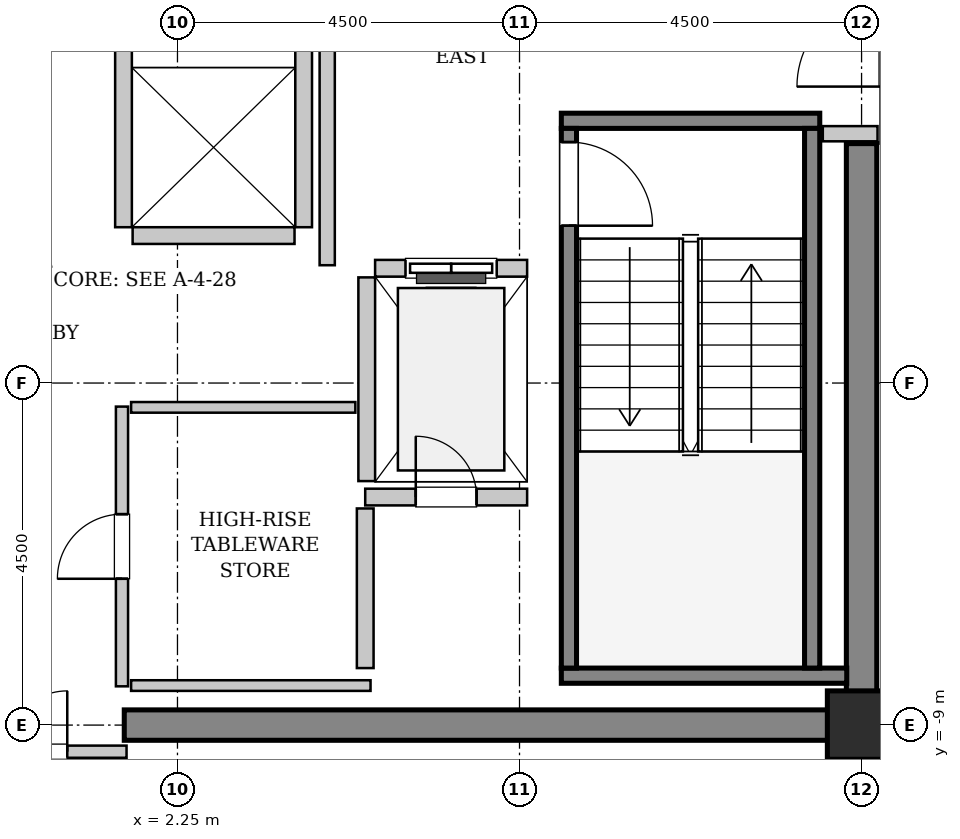
"""IFC4 building model, lengths in metres.
Left out: names, types, materials, properties, quantities, classifications, styles, units other than length and angle.
Written with IfcOpenShell. Run it as: python <this file> out.ifc"""

import sys

from ifc_helpers import new_model, si_unit, direction, frame, frame_2d, origin, origin_2d, place, context, subcontext, project, spatial, rectangle, extrude, source, transform, mapped, element, fill, save


model = new_model("IFC4")
c1 = context("Model", 3, precision=1e-05, world=origin(), true_north=direction((0.0, 1.0)))
c2 = subcontext(c1, "Body", "Model", "MODEL_VIEW")
j1 = project(units=[si_unit("LENGTHUNIT", "METRE"), si_unit("PLANEANGLEUNIT", "RADIAN")], contexts=[c1])
p1 = place(None, origin())
s1 = spatial("IfcSite", under=j1, at=p1, CompositionType="ELEMENT")
p2 = place(p1, origin())
s2 = spatial("IfcBuilding", under=s1, at=p2, CompositionType="ELEMENT")
p3 = place(p2, frame((0.0, 0.0, 330.0)))
s3 = spatial("IfcBuildingStorey", under=s2, at=p3, CompositionType="ELEMENT", Elevation=330.0)
m1 = source(origin(), c2, "Body", "SweptSolid", [
    extrude(rectangle(XDim=9.9, YDim=0.4, at=frame_2d((4.95, 0.0))), origin(), (0.0, 0.0, 1.0), 3.8),
])
p4 = place(p3, frame((1.55, -9.0, 0.0), z_axis=(0.0, 0.0, 1.0), x_axis=(1.0, 0.0, 0.0)))
e1 = element("IfcWall", 1, at=p4, inside=s3, PredefinedType="SHEAR", context=c2, shape_type="MappedRepresentation", body=[
    mapped(m1, transform((0.0, 0.0, 0.0), x_axis=(1.0, 0.0, 0.0), y_axis=(0.0, 1.0, 0.0), z_axis=(0.0, 0.0, 1.0), scale=1.0)),
])
m2 = source(origin(), c2, "Body", "SweptSolid", [
    extrude(rectangle(XDim=7.45, YDim=0.4, at=frame_2d((3.725, 0.0))), origin(), (0.0, 0.0, 1.0), 3.8),
])
p5 = place(p3, frame((11.25, -8.8, 0.0), z_axis=(0.0, 0.0, 1.0), x_axis=(0.0, 1.0, 0.0)))
e2 = element("IfcWall", 2, at=p5, inside=s3, PredefinedType="SHEAR", context=c2, shape_type="MappedRepresentation", body=[
    mapped(m2, transform((0.0, 0.0, 0.0), x_axis=(1.0, 0.0, 0.0), y_axis=(0.0, 1.0, 0.0), z_axis=(0.0, 0.0, 1.0), scale=1.0)),
])
m3 = source(origin(), c2, "Body", "SweptSolid", [
    extrude(rectangle(XDim=0.9, YDim=0.9, at=origin_2d()), origin(), (0.0, 0.0, 1.0), 3.8),
])
p6 = place(p3, frame((11.25, -9.0, 0.0), z_axis=(0.0, 0.0, 1.0), x_axis=(1.0, 0.0, 0.0)))
e3 = element("IfcColumn", 3, at=p6, inside=s3, PredefinedType="COLUMN", context=c2, shape_type="MappedRepresentation", body=[
    mapped(m3, transform((0.0, 0.0, 0.0), x_axis=(1.0, 0.0, 0.0), y_axis=(0.0, 1.0, 0.0), z_axis=(0.0, 0.0, 1.0), scale=1.0)),
])
m4 = source(origin(), c2, "Body", "SweptSolid", [
    extrude(rectangle(XDim=3.4, YDim=0.2, at=frame_2d((1.7, 0.0))), origin(), (0.0, 0.0, 1.0), 3.8),
])
p7 = place(p3, frame((7.3, -1.05, 0.0), z_axis=(0.0, 0.0, 1.0), x_axis=(1.0, 0.0, 0.0)))
e4 = element("IfcWall", 4, at=p7, inside=s3, PredefinedType="SOLIDWALL", context=c2, shape_type="MappedRepresentation", body=[
    mapped(m4, transform((0.0, 0.0, 0.0), x_axis=(1.0, 0.0, 0.0), y_axis=(0.0, 1.0, 0.0), z_axis=(0.0, 0.0, 1.0), scale=1.0)),
])
m5 = source(origin(), c2, "Body", "SweptSolid", [
    extrude(rectangle(XDim=3.755, YDim=0.2, at=frame_2d((1.877, 0.0))), origin(), (0.0, 0.0, 1.0), 3.8),
])
p8 = place(p3, frame((7.3, -8.35, 0.0), z_axis=(0.0, 0.0, 1.0), x_axis=(1.0, 0.0, 0.0)))
e5 = element("IfcWall", 5, at=p8, inside=s3, PredefinedType="SOLIDWALL", context=c2, shape_type="MappedRepresentation", body=[
    mapped(m5, transform((0.0, 0.0, 0.0), x_axis=(1.0, 0.0, 0.0), y_axis=(0.0, 1.0, 0.0), z_axis=(0.0, 0.0, 1.0), scale=1.0)),
])
m6 = source(origin(), c2, "Body", "SweptSolid", [
    extrude(rectangle(XDim=7.1, YDim=0.2, at=frame_2d((3.55, 0.0))), origin(), (0.0, 0.0, 1.0), 3.8),
])
p9 = place(p3, frame((7.4, -1.15, 0.0), z_axis=(0.0, 0.0, 1.0), x_axis=(0.0, -1.0, 0.0)))
e6 = element("IfcWall", 6, at=p9, inside=s3, PredefinedType="SOLIDWALL", context=c2, shape_type="MappedRepresentation", body=[
    mapped(m6, transform((0.0, 0.0, 0.0), x_axis=(1.0, 0.0, 0.0), y_axis=(0.0, 1.0, 0.0), z_axis=(0.0, 0.0, 1.0), scale=1.0)),
])
p10 = place(p9, frame((0.18, 0.0, 0.0)))
e7 = element("IfcOpeningElement", 7, at=p10, cuts=e6, PredefinedType="OPENING", context=c2, shape_type="SweptSolid", body=[
    extrude(rectangle(XDim=1.1, YDim=2.15, at=frame_2d((0.55, 1.075))), frame((0.0, 0.11, 0.0), z_axis=(0.0, -1.0, 0.0), x_axis=(1.0, 0.0, 0.0)), (0.0, 0.0, 1.0), 0.22),
])
p11 = place(p3, frame((10.6, -1.15, 0.0), z_axis=(0.0, 0.0, 1.0), x_axis=(0.0, -1.0, 0.0)))
e8 = element("IfcWall", 8, at=p11, inside=s3, PredefinedType="SOLIDWALL", context=c2, shape_type="MappedRepresentation", body=[
    mapped(m6, transform((0.0, 0.0, 0.0), x_axis=(1.0, 0.0, 0.0), y_axis=(0.0, 1.0, 0.0), z_axis=(0.0, 0.0, 1.0), scale=1.0)),
])
m7 = source(origin(), c2, "Body", "SweptSolid", [
    extrude(rectangle(XDim=2.0, YDim=0.22, at=frame_2d((1.0, 0.0))), origin(), (0.0, 0.0, 1.0), 3.535),
])
p12 = place(p3, frame((6.85, -2.99, 0.0), z_axis=(0.0, 0.0, 1.0), x_axis=(-1.0, 0.0, 0.0)))
e9 = element("IfcWall", 9, at=p12, inside=s3, PredefinedType="SOLIDWALL", context=c2, shape_type="MappedRepresentation", body=[
    mapped(m7, transform((0.0, 0.0, 0.0), x_axis=(1.0, 0.0, 0.0), y_axis=(0.0, 1.0, 0.0), z_axis=(0.0, 0.0, 1.0), scale=1.0)),
])
p13 = place(p12, frame((0.4, 0.0, 0.0)))
e10 = element("IfcOpeningElement", 10, at=p13, cuts=e9, PredefinedType="OPENING", context=c2, shape_type="SweptSolid", body=[
    extrude(rectangle(XDim=1.2, YDim=2.2, at=frame_2d((0.6, 1.1))), frame((0.0, 0.12, 0.0), z_axis=(0.0, -1.0, 0.0), x_axis=(1.0, 0.0, 0.0)), (0.0, 0.0, 1.0), 0.24),
])
m8 = source(origin(), c2, "Body", "SweptSolid", [
    extrude(rectangle(XDim=2.68, YDim=0.22, at=frame_2d((1.34, 0.0))), origin(), (0.0, 0.0, 1.0), 3.535),
])
p14 = place(p3, frame((4.74, -3.11, 0.0), z_axis=(0.0, 0.0, 1.0), x_axis=(0.0, -1.0, 0.0)))
e11 = element("IfcWall", 11, at=p14, inside=s3, PredefinedType="SOLIDWALL", context=c2, shape_type="MappedRepresentation", body=[
    mapped(m8, transform((0.0, 0.0, 0.0), x_axis=(1.0, 0.0, 0.0), y_axis=(0.0, 1.0, 0.0), z_axis=(0.0, 0.0, 1.0), scale=1.0)),
])
m9 = source(origin(), c2, "Body", "SweptSolid", [
    extrude(rectangle(XDim=4.9, YDim=0.22, at=frame_2d((2.45, 0.0))), origin(), (0.0, 0.0, 1.0), 3.535),
])
for number, where, z_axis, x_axis in (
    (12, (1.54, 2.45, 0.0), (0.0, 0.0, 1.0), (0.0, -1.0, 0.0)),
    (13, (3.91, -2.45, 0.0), (0.0, 0.0, 1.0), (0.0, 1.0, 0.0)),
):
    element("IfcWall", number, at=place(p3, frame(where, z_axis=z_axis, x_axis=x_axis)), inside=s3, PredefinedType="SOLIDWALL", context=c2, shape_type="MappedRepresentation", body=[
        mapped(m9, transform((0.0, 0.0, 0.0), x_axis=(1.0, 0.0, 0.0), y_axis=(0.0, 1.0, 0.0), z_axis=(0.0, 0.0, 1.0), scale=1.0)),
    ])
m10 = source(origin(), c2, "Body", "SweptSolid", [
    extrude(rectangle(XDim=2.13, YDim=0.22, at=frame_2d((1.065, 0.0))), origin(), (0.0, 0.0, 1.0), 3.535),
])
p15 = place(p3, frame((1.66, -2.56, 0.0), z_axis=(0.0, 0.0, 1.0), x_axis=(1.0, 0.0, 0.0)))
e14 = element("IfcWall", 14, at=p15, inside=s3, PredefinedType="SOLIDWALL", context=c2, shape_type="MappedRepresentation", body=[
    mapped(m10, transform((0.0, 0.0, 0.0), x_axis=(1.0, 0.0, 0.0), y_axis=(0.0, 1.0, 0.0), z_axis=(0.0, 0.0, 1.0), scale=1.0)),
])
p16 = place(p3, frame((4.72, -6.0, 0.0), z_axis=(0.0, 0.0, 1.0), x_axis=(1.0, 0.0, 0.0)))
e15 = element("IfcWall", 15, at=p16, inside=s3, PredefinedType="SOLIDWALL", context=c2, shape_type="MappedRepresentation", body=[
    mapped(m10, transform((0.0, 0.0, 0.0), x_axis=(1.0, 0.0, 0.0), y_axis=(0.0, 1.0, 0.0), z_axis=(0.0, 0.0, 1.0), scale=1.0)),
])
p17 = place(p16, frame((0.665, 0.0, 0.0)))
e16 = element("IfcOpeningElement", 16, at=p17, cuts=e15, PredefinedType="OPENING", context=c2, shape_type="SweptSolid", body=[
    extrude(rectangle(XDim=0.8, YDim=2.0, at=frame_2d((0.4, 1.0))), frame((0.0, 0.12, 0.0), z_axis=(0.0, -1.0, 0.0), x_axis=(1.0, 0.0, 0.0)), (0.0, 0.0, 1.0), 0.24),
])
m11 = source(origin(), c2, "Body", "SweptSolid", [
    extrude(rectangle(XDim=2.1, YDim=0.22, at=frame_2d((1.05, 0.0))), origin(), (0.0, 0.0, 1.0), 3.535),
])
p18 = place(p3, frame((4.72, -8.25, 0.0), z_axis=(0.0, 0.0, 1.0), x_axis=(0.0, 1.0, 0.0)))
e17 = element("IfcWall", 17, at=p18, inside=s3, PredefinedType="SOLIDWALL", context=c2, shape_type="MappedRepresentation", body=[
    mapped(m11, transform((0.0, 0.0, 0.0), x_axis=(1.0, 0.0, 0.0), y_axis=(0.0, 1.0, 0.0), z_axis=(0.0, 0.0, 1.0), scale=1.0)),
])
m12 = source(origin(), c2, "Body", "SweptSolid", [
    extrude(rectangle(XDim=5.9, YDim=0.2, at=frame_2d((2.95, 0.0))), origin(), (0.0, 0.0, 1.0), 3.535),
])
p19 = place(p3, frame((4.22, -2.95, 0.0), z_axis=(0.0, 0.0, 1.0), x_axis=(0.0, 1.0, 0.0)))
e18 = element("IfcWall", 18, at=p19, inside=s3, PredefinedType="PARTITIONING", context=c2, shape_type="MappedRepresentation", body=[
    mapped(m12, transform((0.0, 0.0, 0.0), x_axis=(1.0, 0.0, 0.0), y_axis=(0.0, 1.0, 0.0), z_axis=(0.0, 0.0, 1.0), scale=1.0)),
])
m13 = source(origin(), c2, "Body", "SweptSolid", [
    extrude(rectangle(XDim=0.72, YDim=0.2, at=frame_2d((0.36, 0.0))), origin(), (0.0, 0.0, 1.0), 3.535),
])
p20 = place(p3, frame((10.74, -1.22, 0.0), z_axis=(0.0, 0.0, 1.0), x_axis=(1.0, 0.0, 0.0)))
e19 = element("IfcWall", 19, at=p20, inside=s3, PredefinedType="PARTITIONING", context=c2, shape_type="MappedRepresentation", body=[
    mapped(m13, transform((0.0, 0.0, 0.0), x_axis=(1.0, 0.0, 0.0), y_axis=(0.0, 1.0, 0.0), z_axis=(0.0, 0.0, 1.0), scale=1.0)),
])
m14 = source(origin(), c2, "Body", "SweptSolid", [
    extrude(rectangle(XDim=3.16, YDim=0.16, at=frame_2d((1.58, 0.0))), origin(), (0.0, 0.0, 1.0), 2.625),
])
p21 = place(p3, frame((-1.58, -9.35, 0.0), z_axis=(0.0, 0.0, 1.0), x_axis=(1.0, 0.0, 0.0)))
e20 = element("IfcWall", 20, at=p21, inside=s3, PredefinedType="PARTITIONING", context=c2, shape_type="MappedRepresentation", body=[
    mapped(m14, transform((0.0, 0.0, 0.0), x_axis=(1.0, 0.0, 0.0), y_axis=(0.0, 1.0, 0.0), z_axis=(0.0, 0.0, 1.0), scale=1.0)),
])
p22 = place(p21, frame((0.78, 0.0, 0.0)))
e21 = element("IfcOpeningElement", 21, at=p22, cuts=e20, PredefinedType="OPENING", context=c2, shape_type="SweptSolid", body=[
    extrude(rectangle(XDim=1.6, YDim=2.3, at=frame_2d((0.8, 1.15))), frame((0.0, 0.09, 0.0), z_axis=(0.0, -1.0, 0.0), x_axis=(1.0, 0.0, 0.0)), (0.0, 0.0, 1.0), 0.18),
])
m15 = source(origin(), c2, "Body", "SweptSolid", [
    extrude(rectangle(XDim=3.68, YDim=0.16, at=frame_2d((1.84, 0.0))), origin(), (0.0, 0.0, 1.0), 3.535),
])
p23 = place(p3, frame((1.52, -8.49, 0.0), z_axis=(0.0, 0.0, 1.0), x_axis=(0.0, 1.0, 0.0)))
e22 = element("IfcWall", 22, at=p23, inside=s3, PredefinedType="PARTITIONING", context=c2, shape_type="MappedRepresentation", body=[
    mapped(m15, transform((0.0, 0.0, 0.0), x_axis=(1.0, 0.0, 0.0), y_axis=(0.0, 1.0, 0.0), z_axis=(0.0, 0.0, 1.0), scale=1.0)),
])
p24 = place(p23, frame((1.415, 0.0, 0.0)))
e23 = element("IfcOpeningElement", 23, at=p24, cuts=e22, PredefinedType="OPENING", context=c2, shape_type="SweptSolid", body=[
    extrude(rectangle(XDim=0.85, YDim=2.1, at=frame_2d((0.425, 1.05))), frame((0.0, 0.09, 0.0), z_axis=(0.0, -1.0, 0.0), x_axis=(1.0, 0.0, 0.0)), (0.0, 0.0, 1.0), 0.18),
])
m16 = source(origin(), c2, "Body", "SweptSolid", [
    extrude(rectangle(XDim=2.95, YDim=0.14, at=frame_2d((1.475, 0.0))), origin(), (0.0, 0.0, 1.0), 3.535),
])
p25 = place(p3, frame((1.64, -4.82, 0.0), z_axis=(0.0, 0.0, 1.0), x_axis=(1.0, 0.0, 0.0)))
e24 = element("IfcWall", 24, at=p25, inside=s3, PredefinedType="PARTITIONING", context=c2, shape_type="MappedRepresentation", body=[
    mapped(m16, transform((0.0, 0.0, 0.0), x_axis=(1.0, 0.0, 0.0), y_axis=(0.0, 1.0, 0.0), z_axis=(0.0, 0.0, 1.0), scale=1.0)),
])
m17 = source(origin(), c2, "Body", "SweptSolid", [
    extrude(rectangle(XDim=3.15, YDim=0.14, at=frame_2d((1.575, 0.0))), origin(), (0.0, 0.0, 1.0), 3.535),
])
p26 = place(p3, frame((1.64, -8.48, 0.0), z_axis=(0.0, 0.0, 1.0), x_axis=(1.0, 0.0, 0.0)))
e25 = element("IfcWall", 25, at=p26, inside=s3, PredefinedType="PARTITIONING", context=c2, shape_type="MappedRepresentation", body=[
    mapped(m17, transform((0.0, 0.0, 0.0), x_axis=(1.0, 0.0, 0.0), y_axis=(0.0, 1.0, 0.0), z_axis=(0.0, 0.0, 1.0), scale=1.0)),
])
m18 = source(origin(), c2, "Body", "SweptSolid", [
    extrude(rectangle(XDim=1.1, YDim=2.15, at=frame_2d((0.55, 1.075))), frame((0.0, 0.025, 0.0), z_axis=(0.0, -1.0, 0.0), x_axis=(1.0, 0.0, 0.0)), (0.0, 0.0, 1.0), 0.05),
])
p27 = place(p10, origin())
e26 = element("IfcDoor", 26, at=p27, inside=s3, OperationType="SINGLE_SWING_RIGHT", PredefinedType="DOOR", context=c2, shape_type="MappedRepresentation", body=[
    mapped(m18, transform((0.0, 0.0, 0.0), x_axis=(1.0, 0.0, 0.0), y_axis=(0.0, 1.0, 0.0), z_axis=(0.0, 0.0, 1.0), scale=1.0)),
])
fill(e7, e26)
m19 = source(origin(), c2, "Body", "SweptSolid", [
    extrude(rectangle(XDim=1.2, YDim=2.2, at=frame_2d((0.6, 1.1))), frame((0.0, 0.025, 0.0), z_axis=(0.0, -1.0, 0.0), x_axis=(1.0, 0.0, 0.0)), (0.0, 0.0, 1.0), 0.05),
])
p28 = place(p13, origin())
e27 = element("IfcDoor", 27, at=p28, inside=s3, OperationType="SLIDING_TO_LEFT", PredefinedType="DOOR", context=c2, shape_type="MappedRepresentation", body=[
    mapped(m19, transform((0.0, 0.0, 0.0), x_axis=(1.0, 0.0, 0.0), y_axis=(0.0, 1.0, 0.0), z_axis=(0.0, 0.0, 1.0), scale=1.0)),
])
fill(e10, e27)
m20 = source(origin(), c2, "Body", "SweptSolid", [
    extrude(rectangle(XDim=0.8, YDim=2.0, at=frame_2d((0.4, 1.0))), frame((0.0, 0.025, 0.0), z_axis=(0.0, -1.0, 0.0), x_axis=(1.0, 0.0, 0.0)), (0.0, 0.0, 1.0), 0.05),
])
p29 = place(p17, origin())
e28 = element("IfcDoor", 28, at=p29, inside=s3, OperationType="SINGLE_SWING_LEFT", PredefinedType="TRAPDOOR", context=c2, shape_type="MappedRepresentation", body=[
    mapped(m20, transform((0.0, 0.0, 0.0), x_axis=(1.0, 0.0, 0.0), y_axis=(0.0, 1.0, 0.0), z_axis=(0.0, 0.0, 1.0), scale=1.0)),
])
fill(e16, e28)
m21 = source(origin(), c2, "Body", "SweptSolid", [
    extrude(rectangle(XDim=1.6, YDim=2.3, at=frame_2d((0.8, 1.15))), frame((0.0, 0.025, 0.0), z_axis=(0.0, -1.0, 0.0), x_axis=(1.0, 0.0, 0.0)), (0.0, 0.0, 1.0), 0.05),
])
p30 = place(p22, origin())
e29 = element("IfcDoor", 29, at=p30, inside=s3, OperationType="DOUBLE_DOOR_SINGLE_SWING", PredefinedType="DOOR", context=c2, shape_type="MappedRepresentation", body=[
    mapped(m21, transform((0.0, 0.0, 0.0), x_axis=(1.0, 0.0, 0.0), y_axis=(0.0, 1.0, 0.0), z_axis=(0.0, 0.0, 1.0), scale=1.0)),
])
fill(e21, e29)
m22 = source(origin(), c2, "Body", "SweptSolid", [
    extrude(rectangle(XDim=0.85, YDim=2.1, at=frame_2d((0.425, 1.05))), frame((0.0, 0.025, 0.0), z_axis=(0.0, -1.0, 0.0), x_axis=(1.0, 0.0, 0.0)), (0.0, 0.0, 1.0), 0.05),
])
p31 = place(p24, origin())
e30 = element("IfcDoor", 30, at=p31, inside=s3, OperationType="SINGLE_SWING_LEFT", PredefinedType="DOOR", context=c2, shape_type="MappedRepresentation", body=[
    mapped(m22, transform((0.0, 0.0, 0.0), x_axis=(1.0, 0.0, 0.0), y_axis=(0.0, 1.0, 0.0), z_axis=(0.0, 0.0, 1.0), scale=1.0)),
])
fill(e23, e30)
save(model, sys.argv[1])
